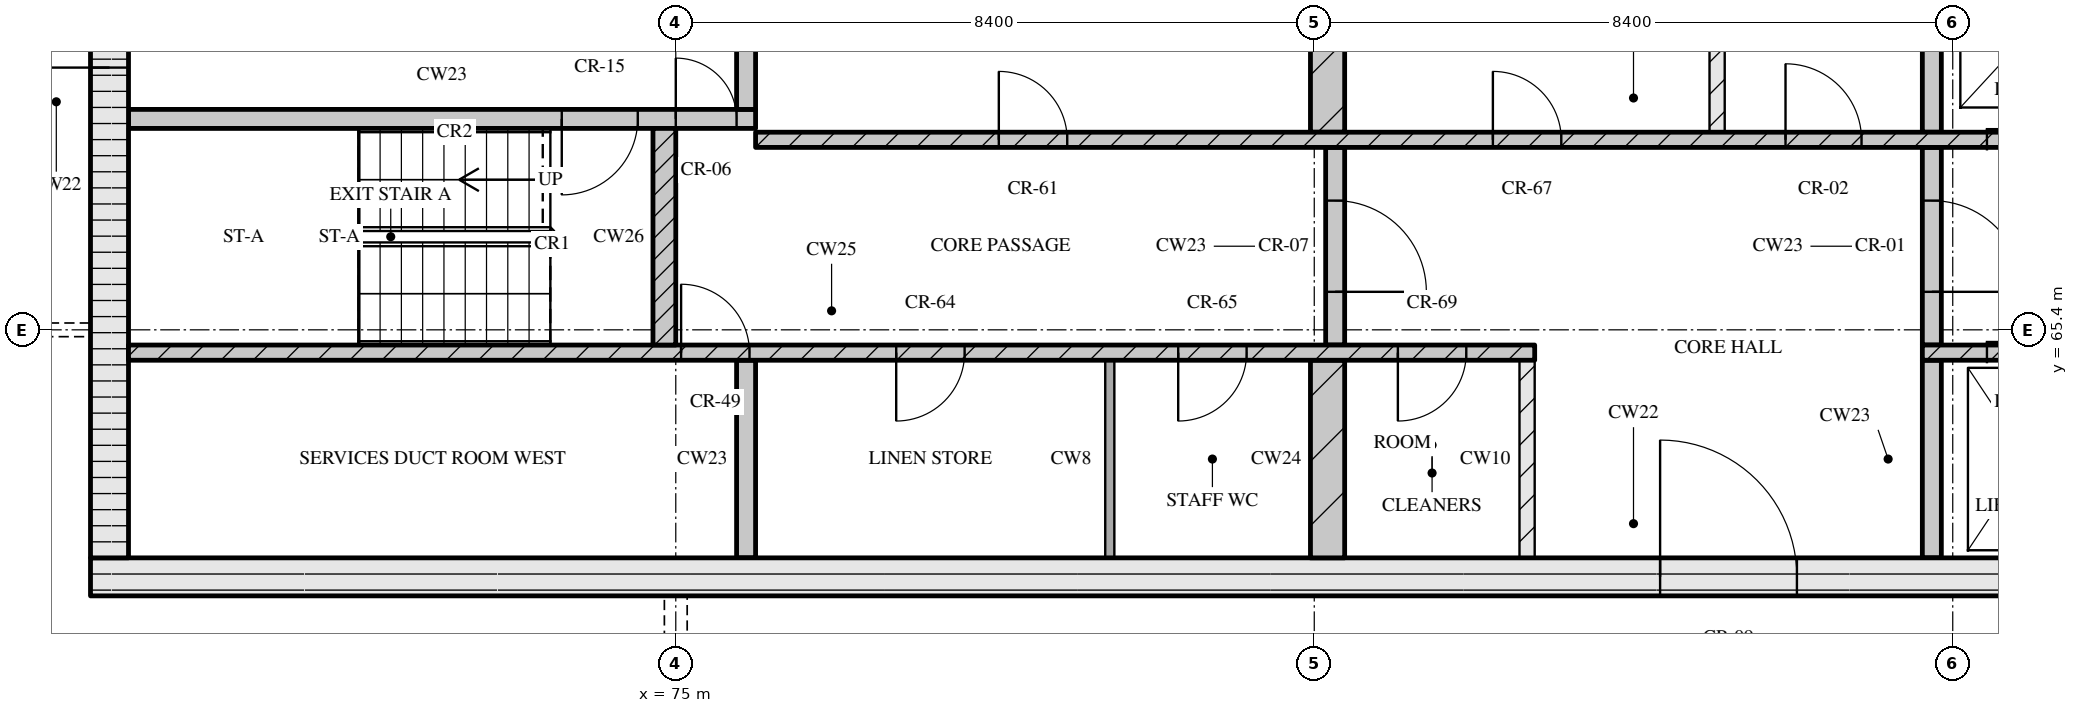
"""IFC4 building model, lengths in metres.
Left out: names, types, materials, properties, quantities, classifications, styles, units other than length and angle.
Written with IfcOpenShell. Run it as: python <this file> out.ifc"""

import sys

from ifc_helpers import new_model, si_unit, direction, frame, frame_2d, origin, place, context, subcontext, project, spatial, rectangle, extrude, element, fill, save


model = new_model("IFC4")
c1 = context("Model", 3, precision=1e-05, world=origin(), true_north=direction((0.0, 1.0)))
c2 = subcontext(c1, "Body", "Model", "MODEL_VIEW")
j1 = project(units=[si_unit("LENGTHUNIT", "METRE"), si_unit("PLANEANGLEUNIT", "RADIAN")], contexts=[c1])
p1 = place(None, origin())
s1 = spatial("IfcSite", under=j1, at=p1, CompositionType="ELEMENT")
p2 = place(p1, origin())
s2 = spatial("IfcBuilding", under=s1, at=p2, CompositionType="ELEMENT")
p3 = place(p2, frame((0.0, 0.0, 270.75)))
s3 = spatial("IfcBuildingStorey", under=s2, at=p3, CompositionType="ELEMENT", Elevation=270.75)
p4 = place(p3, frame((67.3, 62.15, 0.0), z_axis=(0.0, 0.0, 1.0), x_axis=(1.0, 0.0, 0.0)))
e1 = element("IfcWall", 1, at=p4, inside=s3, PredefinedType="SOLIDWALL", context=c2, shape_type="SweptSolid", body=[
    extrude(rectangle(XDim=40.6, YDim=0.5, at=frame_2d((20.3, 0.0))), origin(), (0.0, 0.0, 1.0), 3.32),
])
p5 = place(p4, frame((20.65, 0.0, 0.0)))
e2 = element("IfcOpeningElement", 2, at=p5, cuts=e1, PredefinedType="OPENING", context=c2, shape_type="SweptSolid", body=[
    extrude(rectangle(XDim=1.8, YDim=2.1, at=frame_2d((0.9, 1.05))), frame((0.0, 0.26, 0.0), z_axis=(0.0, -1.0, 0.0), x_axis=(1.0, 0.0, 0.0)), (0.0, 0.0, 1.0), 0.52),
])
p6 = place(p3, frame((67.55, 62.4, 0.0), z_axis=(0.0, 0.0, 1.0), x_axis=(0.0, 1.0, 0.0)))
e3 = element("IfcWall", 3, at=p6, inside=s3, PredefinedType="SOLIDWALL", context=c2, shape_type="SweptSolid", body=[
    extrude(rectangle(XDim=12.0, YDim=0.5, at=frame_2d((6.0, 0.0))), origin(), (0.0, 0.0, 1.0), 3.32),
])
p7 = place(p6, frame((6.45, 0.0, 0.0)))
e4 = element("IfcOpeningElement", 4, at=p7, cuts=e3, PredefinedType="OPENING", context=c2, shape_type="SweptSolid", body=[
    extrude(rectangle(XDim=1.2, YDim=2.1, at=frame_2d((0.6, 1.05))), frame((0.0, 0.26, 0.0), z_axis=(0.0, -1.0, 0.0), x_axis=(1.0, 0.0, 0.0)), (0.0, 0.0, 1.0), 0.52),
])
p8 = place(p3, frame((75.925, 62.4, 0.0), z_axis=(0.0, 0.0, 1.0), x_axis=(0.0, 1.0, 0.0)))
e5 = element("IfcWall", 5, at=p8, inside=s3, PredefinedType="SOLIDWALL", context=c2, shape_type="SweptSolid", body=[
    extrude(rectangle(XDim=2.6, YDim=0.25, at=frame_2d((1.3, 0.0))), origin(), (0.0, 0.0, 1.0), 3.32),
])
p9 = place(p3, frame((80.71, 62.4, 0.0), z_axis=(0.0, 0.0, 1.0), x_axis=(0.0, 1.0, 0.0)))
e6 = element("IfcWall", 6, at=p9, inside=s3, PredefinedType="PARTITIONING", context=c2, shape_type="SweptSolid", body=[
    extrude(rectangle(XDim=2.6, YDim=0.12, at=frame_2d((1.3, 0.0))), origin(), (0.0, 0.0, 1.0), 3.32),
])
p10 = place(p3, frame((83.575, 62.4, 0.0), z_axis=(0.0, 0.0, 1.0), x_axis=(0.0, 1.0, 0.0)))
e7 = element("IfcWall", 7, at=p10, inside=s3, PredefinedType="SOLIDWALL", context=c2, shape_type="SweptSolid", body=[
    extrude(rectangle(XDim=2.6, YDim=0.45, at=frame_2d((1.3, 0.0))), origin(), (0.0, 0.0, 1.0), 3.32),
])
p11 = place(p3, frame((86.2, 62.4, 0.0), z_axis=(0.0, 0.0, 1.0), x_axis=(0.0, 1.0, 0.0)))
e8 = element("IfcWall", 8, at=p11, inside=s3, PredefinedType="PARTITIONING", context=c2, shape_type="SweptSolid", body=[
    extrude(rectangle(XDim=2.6, YDim=0.2, at=frame_2d((1.3, 0.0))), origin(), (0.0, 0.0, 1.0), 3.32),
])
p12 = place(p3, frame((91.525, 62.4, 0.0), z_axis=(0.0, 0.0, 1.0), x_axis=(0.0, 1.0, 0.0)))
e9 = element("IfcWall", 9, at=p12, inside=s3, PredefinedType="SOLIDWALL", context=c2, shape_type="SweptSolid", body=[
    extrude(rectangle(XDim=2.6, YDim=0.25, at=frame_2d((1.3, 0.0))), origin(), (0.0, 0.0, 1.0), 3.32),
])
p13 = place(p3, frame((67.8, 65.1, 0.0), z_axis=(0.0, 0.0, 1.0), x_axis=(1.0, 0.0, 0.0)))
e10 = element("IfcWall", 10, at=p13, inside=s3, PredefinedType="SOLIDWALL", context=c2, shape_type="SweptSolid", body=[
    extrude(rectangle(XDim=18.5, YDim=0.2, at=frame_2d((9.25, 0.0))), origin(), (0.0, 0.0, 1.0), 3.32),
])
p14 = place(p13, frame((7.27, 0.0, 0.0)))
e11 = element("IfcOpeningElement", 11, at=p14, cuts=e10, PredefinedType="OPENING", context=c2, shape_type="SweptSolid", body=[
    extrude(rectangle(XDim=0.9, YDim=2.1, at=frame_2d((0.45, 1.05))), frame((0.0, 0.11, 0.0), z_axis=(0.0, -1.0, 0.0), x_axis=(1.0, 0.0, 0.0)), (0.0, 0.0, 1.0), 0.22),
])
p15 = place(p13, frame((10.1, 0.0, 0.0)))
e12 = element("IfcOpeningElement", 12, at=p15, cuts=e10, PredefinedType="OPENING", context=c2, shape_type="SweptSolid", body=[
    extrude(rectangle(XDim=0.9, YDim=2.1, at=frame_2d((0.45, 1.05))), frame((0.0, 0.11, 0.0), z_axis=(0.0, -1.0, 0.0), x_axis=(1.0, 0.0, 0.0)), (0.0, 0.0, 1.0), 0.22),
])
p16 = place(p13, frame((13.81, 0.0, 0.0)))
e13 = element("IfcOpeningElement", 13, at=p16, cuts=e10, PredefinedType="OPENING", context=c2, shape_type="SweptSolid", body=[
    extrude(rectangle(XDim=0.9, YDim=2.1, at=frame_2d((0.45, 1.05))), frame((0.0, 0.11, 0.0), z_axis=(0.0, -1.0, 0.0), x_axis=(1.0, 0.0, 0.0)), (0.0, 0.0, 1.0), 0.22),
])
p17 = place(p13, frame((16.7, 0.0, 0.0)))
e14 = element("IfcOpeningElement", 14, at=p17, cuts=e10, PredefinedType="OPENING", context=c2, shape_type="SweptSolid", body=[
    extrude(rectangle(XDim=0.9, YDim=2.1, at=frame_2d((0.45, 1.05))), frame((0.0, 0.11, 0.0), z_axis=(0.0, -1.0, 0.0), x_axis=(1.0, 0.0, 0.0)), (0.0, 0.0, 1.0), 0.22),
])
p18 = place(p3, frame((91.4, 65.1, 0.0), z_axis=(0.0, 0.0, 1.0), x_axis=(1.0, 0.0, 0.0)))
e15 = element("IfcWall", 15, at=p18, inside=s3, PredefinedType="SOLIDWALL", context=c2, shape_type="SweptSolid", body=[
    extrude(rectangle(XDim=16.0, YDim=0.2, at=frame_2d((8.0, 0.0))), origin(), (0.0, 0.0, 1.0), 3.32),
])
p19 = place(p18, frame((0.85, 0.0, 0.0)))
e16 = element("IfcOpeningElement", 16, at=p19, cuts=e15, PredefinedType="OPENING", context=c2, shape_type="SweptSolid", body=[
    extrude(rectangle(XDim=1.1, YDim=2.1, at=frame_2d((0.55, 1.05))), frame((0.0, 0.11, 0.0), z_axis=(0.0, -1.0, 0.0), x_axis=(1.0, 0.0, 0.0)), (0.0, 0.0, 1.0), 0.22),
])
p20 = place(p18, frame((3.35, 0.0, 0.0)))
e17 = element("IfcOpeningElement", 17, at=p20, cuts=e15, PredefinedType="OPENING", context=c2, shape_type="SweptSolid", body=[
    extrude(rectangle(XDim=1.1, YDim=2.1, at=frame_2d((0.55, 1.05))), frame((0.0, 0.11, 0.0), z_axis=(0.0, -1.0, 0.0), x_axis=(1.0, 0.0, 0.0)), (0.0, 0.0, 1.0), 0.22),
])
p21 = place(p18, frame((5.85, 0.0, 0.0)))
e18 = element("IfcOpeningElement", 18, at=p21, cuts=e15, PredefinedType="OPENING", context=c2, shape_type="SweptSolid", body=[
    extrude(rectangle(XDim=1.1, YDim=2.1, at=frame_2d((0.55, 1.05))), frame((0.0, 0.11, 0.0), z_axis=(0.0, -1.0, 0.0), x_axis=(1.0, 0.0, 0.0)), (0.0, 0.0, 1.0), 0.22),
])
p22 = place(p18, frame((7.83, 0.0, 0.0)))
e19 = element("IfcOpeningElement", 19, at=p22, cuts=e15, PredefinedType="OPENING", context=c2, shape_type="SweptSolid", body=[
    extrude(rectangle(XDim=0.9, YDim=2.1, at=frame_2d((0.45, 1.05))), frame((0.0, 0.11, 0.0), z_axis=(0.0, -1.0, 0.0), x_axis=(1.0, 0.0, 0.0)), (0.0, 0.0, 1.0), 0.22),
])
p23 = place(p3, frame((74.85, 65.2, 0.0), z_axis=(0.0, 0.0, 1.0), x_axis=(0.0, 1.0, 0.0)))
e20 = element("IfcWall", 20, at=p23, inside=s3, PredefinedType="SOLIDWALL", context=c2, shape_type="SweptSolid", body=[
    extrude(rectangle(XDim=2.85, YDim=0.3, at=frame_2d((1.425, 0.0))), origin(), (0.0, 0.0, 1.0), 3.32),
])
p24 = place(p3, frame((83.675, 65.2, 0.0), z_axis=(0.0, 0.0, 1.0), x_axis=(0.0, 1.0, 0.0)))
e21 = element("IfcWall", 21, at=p24, inside=s3, PredefinedType="SOLIDWALL", context=c2, shape_type="SweptSolid", body=[
    extrude(rectangle(XDim=2.6, YDim=0.25, at=frame_2d((1.3, 0.0))), origin(), (0.0, 0.0, 1.0), 3.32),
])
p25 = place(p24, frame((0.7, 0.0, 0.0)))
e22 = element("IfcOpeningElement", 22, at=p25, cuts=e21, PredefinedType="OPENING", context=c2, shape_type="SweptSolid", body=[
    extrude(rectangle(XDim=1.2, YDim=2.1, at=frame_2d((0.6, 1.05))), frame((0.0, 0.135, 0.0), z_axis=(0.0, -1.0, 0.0), x_axis=(1.0, 0.0, 0.0)), (0.0, 0.0, 1.0), 0.27),
])
p26 = place(p3, frame((91.525, 65.2, 0.0), z_axis=(0.0, 0.0, 1.0), x_axis=(0.0, 1.0, 0.0)))
e23 = element("IfcWall", 23, at=p26, inside=s3, PredefinedType="SOLIDWALL", context=c2, shape_type="SweptSolid", body=[
    extrude(rectangle(XDim=2.6, YDim=0.25, at=frame_2d((1.3, 0.0))), origin(), (0.0, 0.0, 1.0), 3.32),
])
p27 = place(p26, frame((0.7, 0.0, 0.0)))
e24 = element("IfcOpeningElement", 24, at=p27, cuts=e23, PredefinedType="OPENING", context=c2, shape_type="SweptSolid", body=[
    extrude(rectangle(XDim=1.2, YDim=2.1, at=frame_2d((0.6, 1.05))), frame((0.0, 0.135, 0.0), z_axis=(0.0, -1.0, 0.0), x_axis=(1.0, 0.0, 0.0)), (0.0, 0.0, 1.0), 0.27),
])
p28 = place(p3, frame((76.05, 67.9, 0.0), z_axis=(0.0, 0.0, 1.0), x_axis=(1.0, 0.0, 0.0)))
e25 = element("IfcWall", 25, at=p28, inside=s3, PredefinedType="SOLIDWALL", context=c2, shape_type="SweptSolid", body=[
    extrude(rectangle(XDim=23.1, YDim=0.2, at=frame_2d((11.55, 0.0))), origin(), (0.0, 0.0, 1.0), 3.32),
])
p29 = place(p28, frame((3.2, 0.0, 0.0)))
e26 = element("IfcOpeningElement", 26, at=p29, cuts=e25, PredefinedType="OPENING", context=c2, shape_type="SweptSolid", body=[
    extrude(rectangle(XDim=0.9, YDim=2.1, at=frame_2d((0.45, 1.05))), frame((0.0, 0.11, 0.0), z_axis=(0.0, -1.0, 0.0), x_axis=(1.0, 0.0, 0.0)), (0.0, 0.0, 1.0), 0.22),
])
p30 = place(p28, frame((9.7, 0.0, 0.0)))
e27 = element("IfcOpeningElement", 27, at=p30, cuts=e25, PredefinedType="OPENING", context=c2, shape_type="SweptSolid", body=[
    extrude(rectangle(XDim=0.9, YDim=2.1, at=frame_2d((0.45, 1.05))), frame((0.0, 0.11, 0.0), z_axis=(0.0, -1.0, 0.0), x_axis=(1.0, 0.0, 0.0)), (0.0, 0.0, 1.0), 0.22),
])
p31 = place(p28, frame((13.55, 0.0, 0.0)))
e28 = element("IfcOpeningElement", 28, at=p31, cuts=e25, PredefinedType="OPENING", context=c2, shape_type="SweptSolid", body=[
    extrude(rectangle(XDim=1.0, YDim=2.1, at=frame_2d((0.5, 1.05))), frame((0.0, 0.11, 0.0), z_axis=(0.0, -1.0, 0.0), x_axis=(1.0, 0.0, 0.0)), (0.0, 0.0, 1.0), 0.22),
])
p32 = place(p28, frame((16.2, 0.0, 0.0)))
e29 = element("IfcOpeningElement", 29, at=p32, cuts=e25, PredefinedType="OPENING", context=c2, shape_type="SweptSolid", body=[
    extrude(rectangle(XDim=1.1, YDim=2.1, at=frame_2d((0.55, 1.05))), frame((0.0, 0.11, 0.0), z_axis=(0.0, -1.0, 0.0), x_axis=(1.0, 0.0, 0.0)), (0.0, 0.0, 1.0), 0.22),
])
p33 = place(p28, frame((18.7, 0.0, 0.0)))
e30 = element("IfcOpeningElement", 30, at=p33, cuts=e25, PredefinedType="OPENING", context=c2, shape_type="SweptSolid", body=[
    extrude(rectangle(XDim=1.1, YDim=2.1, at=frame_2d((0.55, 1.05))), frame((0.0, 0.11, 0.0), z_axis=(0.0, -1.0, 0.0), x_axis=(1.0, 0.0, 0.0)), (0.0, 0.0, 1.0), 0.22),
])
p34 = place(p28, frame((21.2, 0.0, 0.0)))
e31 = element("IfcOpeningElement", 31, at=p34, cuts=e25, PredefinedType="OPENING", context=c2, shape_type="SweptSolid", body=[
    extrude(rectangle(XDim=1.1, YDim=2.1, at=frame_2d((0.55, 1.05))), frame((0.0, 0.11, 0.0), z_axis=(0.0, -1.0, 0.0), x_axis=(1.0, 0.0, 0.0)), (0.0, 0.0, 1.0), 0.22),
])
p35 = place(p3, frame((83.575, 68.0, 0.0), z_axis=(0.0, 0.0, 1.0), x_axis=(0.0, 1.0, 0.0)))
e32 = element("IfcWall", 32, at=p35, inside=s3, PredefinedType="SOLIDWALL", context=c2, shape_type="SweptSolid", body=[
    extrude(rectangle(XDim=2.6, YDim=0.45, at=frame_2d((1.3, 0.0))), origin(), (0.0, 0.0, 1.0), 3.32),
])
p36 = place(p3, frame((88.7, 68.0, 0.0), z_axis=(0.0, 0.0, 1.0), x_axis=(0.0, 1.0, 0.0)))
e33 = element("IfcWall", 33, at=p36, inside=s3, PredefinedType="PARTITIONING", context=c2, shape_type="SweptSolid", body=[
    extrude(rectangle(XDim=2.6, YDim=0.2, at=frame_2d((1.3, 0.0))), origin(), (0.0, 0.0, 1.0), 3.32),
])
p37 = place(p3, frame((91.525, 68.0, 0.0), z_axis=(0.0, 0.0, 1.0), x_axis=(0.0, 1.0, 0.0)))
e34 = element("IfcWall", 34, at=p37, inside=s3, PredefinedType="SOLIDWALL", context=c2, shape_type="SweptSolid", body=[
    extrude(rectangle(XDim=2.6, YDim=0.25, at=frame_2d((1.3, 0.0))), origin(), (0.0, 0.0, 1.0), 3.32),
])
p38 = place(p3, frame((67.8, 68.175, 0.0), z_axis=(0.0, 0.0, 1.0), x_axis=(1.0, 0.0, 0.0)))
e35 = element("IfcWall", 35, at=p38, inside=s3, PredefinedType="SOLIDWALL", context=c2, shape_type="SweptSolid", body=[
    extrude(rectangle(XDim=8.25, YDim=0.25, at=frame_2d((4.125, 0.0))), origin(), (0.0, 0.0, 1.0), 3.32),
])
p39 = place(p38, frame((5.7, 0.0, 0.0)))
e36 = element("IfcOpeningElement", 36, at=p39, cuts=e35, PredefinedType="OPENING", context=c2, shape_type="SweptSolid", body=[
    extrude(rectangle(XDim=1.0, YDim=2.1, at=frame_2d((0.5, 1.05))), frame((0.0, 0.135, 0.0), z_axis=(0.0, -1.0, 0.0), x_axis=(1.0, 0.0, 0.0)), (0.0, 0.0, 1.0), 0.27),
])
p40 = place(p38, frame((7.2, 0.0, 0.0)))
e37 = element("IfcOpeningElement", 37, at=p40, cuts=e35, PredefinedType="OPENING", context=c2, shape_type="SweptSolid", body=[
    extrude(rectangle(XDim=0.8, YDim=2.1, at=frame_2d((0.4, 1.05))), frame((0.0, 0.135, 0.0), z_axis=(0.0, -1.0, 0.0), x_axis=(1.0, 0.0, 0.0)), (0.0, 0.0, 1.0), 0.27),
])
p41 = place(p3, frame((75.925, 68.3, 0.0), z_axis=(0.0, 0.0, 1.0), x_axis=(0.0, 1.0, 0.0)))
e38 = element("IfcWall", 38, at=p41, inside=s3, PredefinedType="SOLIDWALL", context=c2, shape_type="SweptSolid", body=[
    extrude(rectangle(XDim=2.3, YDim=0.25, at=frame_2d((1.15, 0.0))), origin(), (0.0, 0.0, 1.0), 3.32),
])
p42 = place(p5, origin())
e39 = element("IfcDoor", 39, at=p42, inside=s3, OperationType="DOUBLE_DOOR_SINGLE_SWING", PredefinedType="DOOR", context=c2, shape_type="SweptSolid", body=[
    extrude(rectangle(XDim=1.8, YDim=2.1, at=frame_2d((0.9, 1.05))), frame((0.0, 0.025, 0.0), z_axis=(0.0, -1.0, 0.0), x_axis=(1.0, 0.0, 0.0)), (0.0, 0.0, 1.0), 0.05),
])
fill(e2, e39)
p43 = place(p14, origin())
e40 = element("IfcDoor", 40, at=p43, inside=s3, OperationType="SINGLE_SWING_LEFT", PredefinedType="DOOR", context=c2, shape_type="SweptSolid", body=[
    extrude(rectangle(XDim=0.9, YDim=2.1, at=frame_2d((0.45, 1.05))), frame((0.0, 0.025, 0.0), z_axis=(0.0, -1.0, 0.0), x_axis=(1.0, 0.0, 0.0)), (0.0, 0.0, 1.0), 0.05),
])
fill(e11, e40)
p44 = place(p15, origin())
e41 = element("IfcDoor", 41, at=p44, inside=s3, OperationType="SINGLE_SWING_RIGHT", PredefinedType="DOOR", context=c2, shape_type="SweptSolid", body=[
    extrude(rectangle(XDim=0.9, YDim=2.1, at=frame_2d((0.45, 1.05))), frame((0.0, 0.025, 0.0), z_axis=(0.0, -1.0, 0.0), x_axis=(1.0, 0.0, 0.0)), (0.0, 0.0, 1.0), 0.05),
])
fill(e12, e41)
p45 = place(p16, origin())
e42 = element("IfcDoor", 42, at=p45, inside=s3, OperationType="SINGLE_SWING_RIGHT", PredefinedType="DOOR", context=c2, shape_type="SweptSolid", body=[
    extrude(rectangle(XDim=0.9, YDim=2.1, at=frame_2d((0.45, 1.05))), frame((0.0, 0.025, 0.0), z_axis=(0.0, -1.0, 0.0), x_axis=(1.0, 0.0, 0.0)), (0.0, 0.0, 1.0), 0.05),
])
fill(e13, e42)
p46 = place(p17, origin())
e43 = element("IfcDoor", 43, at=p46, inside=s3, OperationType="SINGLE_SWING_RIGHT", PredefinedType="DOOR", context=c2, shape_type="SweptSolid", body=[
    extrude(rectangle(XDim=0.9, YDim=2.1, at=frame_2d((0.45, 1.05))), frame((0.0, 0.025, 0.0), z_axis=(0.0, -1.0, 0.0), x_axis=(1.0, 0.0, 0.0)), (0.0, 0.0, 1.0), 0.05),
])
fill(e14, e43)
p47 = place(p19, origin())
e44 = element("IfcDoor", 44, at=p47, inside=s3, OperationType="SLIDING_TO_LEFT", PredefinedType="DOOR", context=c2, shape_type="SweptSolid", body=[
    extrude(rectangle(XDim=1.1, YDim=2.1, at=frame_2d((0.55, 1.05))), frame((0.0, 0.025, 0.0), z_axis=(0.0, -1.0, 0.0), x_axis=(1.0, 0.0, 0.0)), (0.0, 0.0, 1.0), 0.05),
])
fill(e16, e44)
p48 = place(p25, origin())
e45 = element("IfcDoor", 45, at=p48, inside=s3, OperationType="SINGLE_SWING_RIGHT", PredefinedType="DOOR", context=c2, shape_type="SweptSolid", body=[
    extrude(rectangle(XDim=1.2, YDim=2.1, at=frame_2d((0.6, 1.05))), frame((0.0, 0.025, 0.0), z_axis=(0.0, -1.0, 0.0), x_axis=(1.0, 0.0, 0.0)), (0.0, 0.0, 1.0), 0.05),
])
fill(e22, e45)
p49 = place(p27, origin())
e46 = element("IfcDoor", 46, at=p49, inside=s3, OperationType="SINGLE_SWING_RIGHT", PredefinedType="DOOR", context=c2, shape_type="SweptSolid", body=[
    extrude(rectangle(XDim=1.2, YDim=2.1, at=frame_2d((0.6, 1.05))), frame((0.0, 0.025, 0.0), z_axis=(0.0, -1.0, 0.0), x_axis=(1.0, 0.0, 0.0)), (0.0, 0.0, 1.0), 0.05),
])
fill(e24, e46)
p50 = place(p29, origin())
e47 = element("IfcDoor", 47, at=p50, inside=s3, OperationType="SINGLE_SWING_LEFT", PredefinedType="DOOR", context=c2, shape_type="SweptSolid", body=[
    extrude(rectangle(XDim=0.9, YDim=2.1, at=frame_2d((0.45, 1.05))), frame((0.0, 0.025, 0.0), z_axis=(0.0, -1.0, 0.0), x_axis=(1.0, 0.0, 0.0)), (0.0, 0.0, 1.0), 0.05),
])
fill(e26, e47)
p51 = place(p30, origin())
e48 = element("IfcDoor", 48, at=p51, inside=s3, OperationType="SINGLE_SWING_LEFT", PredefinedType="DOOR", context=c2, shape_type="SweptSolid", body=[
    extrude(rectangle(XDim=0.9, YDim=2.1, at=frame_2d((0.45, 1.05))), frame((0.0, 0.025, 0.0), z_axis=(0.0, -1.0, 0.0), x_axis=(1.0, 0.0, 0.0)), (0.0, 0.0, 1.0), 0.05),
])
fill(e27, e48)
p52 = place(p31, origin())
e49 = element("IfcDoor", 49, at=p52, inside=s3, OperationType="SINGLE_SWING_LEFT", PredefinedType="DOOR", context=c2, shape_type="SweptSolid", body=[
    extrude(rectangle(XDim=1.0, YDim=2.1, at=frame_2d((0.5, 1.05))), frame((0.0, 0.025, 0.0), z_axis=(0.0, -1.0, 0.0), x_axis=(1.0, 0.0, 0.0)), (0.0, 0.0, 1.0), 0.05),
])
fill(e28, e49)
p53 = place(p32, origin())
e50 = element("IfcDoor", 50, at=p53, inside=s3, OperationType="SLIDING_TO_RIGHT", PredefinedType="DOOR", context=c2, shape_type="SweptSolid", body=[
    extrude(rectangle(XDim=1.1, YDim=2.1, at=frame_2d((0.55, 1.05))), frame((0.0, 0.025, 0.0), z_axis=(0.0, -1.0, 0.0), x_axis=(1.0, 0.0, 0.0)), (0.0, 0.0, 1.0), 0.05),
])
fill(e29, e50)
p54 = place(p39, origin())
e51 = element("IfcDoor", 51, at=p54, inside=s3, OperationType="SINGLE_SWING_RIGHT", PredefinedType="DOOR", context=c2, shape_type="SweptSolid", body=[
    extrude(rectangle(XDim=1.0, YDim=2.1, at=frame_2d((0.5, 1.05))), frame((0.0, 0.025, 0.0), z_axis=(0.0, -1.0, 0.0), x_axis=(1.0, 0.0, 0.0)), (0.0, 0.0, 1.0), 0.05),
])
fill(e36, e51)
p55 = place(p40, origin())
e52 = element("IfcDoor", 52, at=p55, inside=s3, OperationType="SINGLE_SWING_LEFT", PredefinedType="DOOR", context=c2, shape_type="SweptSolid", body=[
    extrude(rectangle(XDim=0.8, YDim=2.1, at=frame_2d((0.4, 1.05))), frame((0.0, 0.025, 0.0), z_axis=(0.0, -1.0, 0.0), x_axis=(1.0, 0.0, 0.0)), (0.0, 0.0, 1.0), 0.05),
])
fill(e37, e52)
p56 = place(p7, origin())
e53 = element("IfcDoor", 53, at=p56, inside=s3, OperationType="SINGLE_SWING_LEFT", PredefinedType="DOOR", context=c2, shape_type="SweptSolid", body=[
    extrude(rectangle(XDim=1.2, YDim=2.1, at=frame_2d((0.6, 1.05))), frame((0.0, 0.025, 0.0), z_axis=(0.0, -1.0, 0.0), x_axis=(1.0, 0.0, 0.0)), (0.0, 0.0, 1.0), 0.05),
])
fill(e4, e53)
save(model, sys.argv[1])
